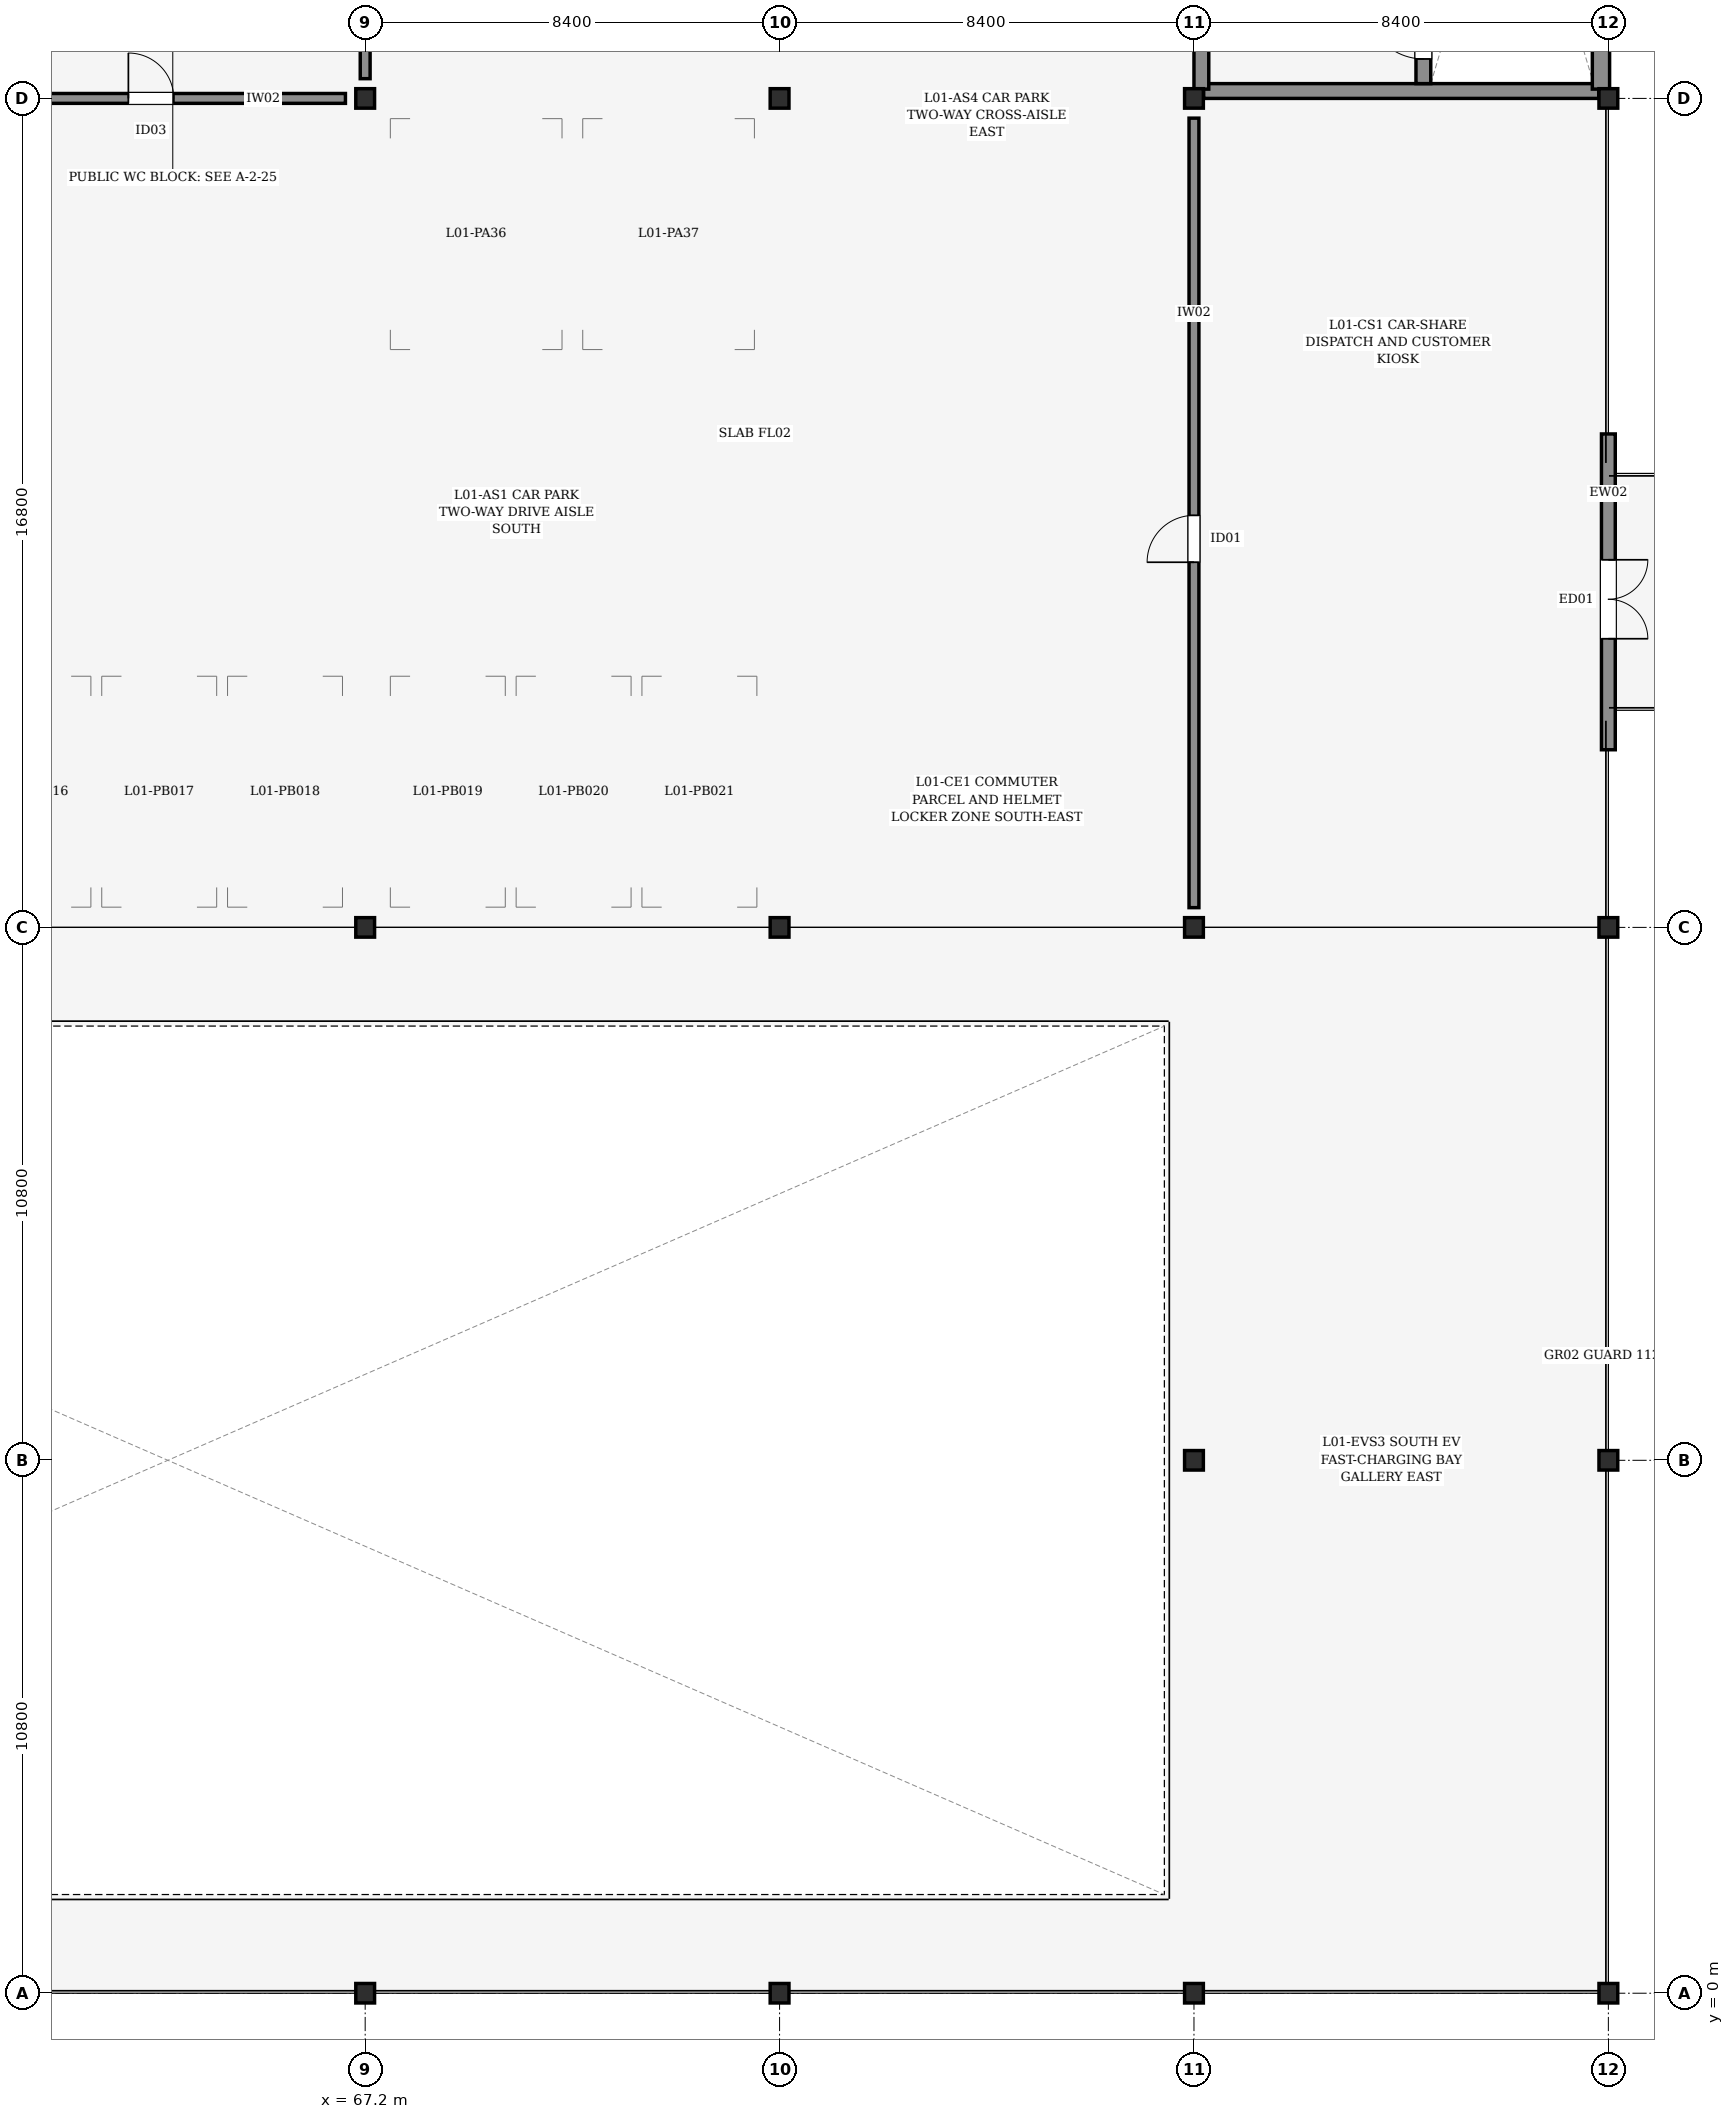
"""IFC4 building model, lengths in metres.
Left out: names, types, materials, properties, quantities, classifications, styles, units other than length and angle.
Written with IfcOpenShell. Run it as: python <this file> out.ifc"""

import sys

from ifc_helpers import new_model, si_unit, direction, frame, frame_2d, origin, origin_2d, place, context, subcontext, project, spatial, rectangle, i_section, extrude, element, fill, save


model = new_model("IFC4")
c1 = context("Model", 3, precision=1e-05, world=origin(), true_north=direction((0.0, 1.0)))
c2 = subcontext(c1, "Body", "Model", "MODEL_VIEW")
j1 = project(units=[si_unit("LENGTHUNIT", "METRE"), si_unit("PLANEANGLEUNIT", "RADIAN")], contexts=[c1])
p1 = place(None, origin())
s1 = spatial("IfcSite", under=j1, at=p1, CompositionType="ELEMENT")
p2 = place(p1, origin())
s2 = spatial("IfcBuilding", under=s1, at=p2, CompositionType="ELEMENT")
p3 = place(p2, frame((0.0, 0.0, 5.4)))
s3 = spatial("IfcBuildingStorey", under=s2, at=p3, CompositionType="ELEMENT", Elevation=5.4)
for number, where, z_axis, x_axis in (
    (1, (67.2, 0.0, 0.0), (0.0, 0.0, 1.0), (1.0, 0.0, 0.0)),
    (2, (67.2, 21.6, 0.0), (0.0, 0.0, 1.0), (1.0, 0.0, 0.0)),
    (3, (67.2, 38.4, 0.0), (0.0, 0.0, 1.0), (1.0, 0.0, 0.0)),
    (4, (75.6, 0.0, 0.0), (0.0, 0.0, 1.0), (1.0, 0.0, 0.0)),
    (5, (75.6, 21.6, 0.0), (0.0, 0.0, 1.0), (1.0, 0.0, 0.0)),
    (6, (75.6, 38.4, 0.0), (0.0, 0.0, 1.0), (1.0, 0.0, 0.0)),
    (7, (84.0, 0.0, 0.0), (0.0, 0.0, 1.0), (1.0, 0.0, 0.0)),
    (8, (84.0, 10.8, 0.0), (0.0, 0.0, 1.0), (1.0, 0.0, 0.0)),
    (9, (84.0, 21.6, 0.0), (0.0, 0.0, 1.0), (1.0, 0.0, 0.0)),
    (10, (84.0, 38.4, 0.0), (0.0, 0.0, 1.0), (1.0, 0.0, 0.0)),
    (11, (92.4, 0.0, 0.0), (0.0, 0.0, 1.0), (1.0, 0.0, 0.0)),
    (12, (92.4, 10.8, 0.0), (0.0, 0.0, 1.0), (1.0, 0.0, 0.0)),
    (13, (92.4, 21.6, 0.0), (0.0, 0.0, 1.0), (1.0, 0.0, 0.0)),
    (14, (92.4, 38.4, 0.0), (0.0, 0.0, 1.0), (1.0, 0.0, 0.0)),
):
    element("IfcColumn", number, at=place(p3, frame(where, z_axis=z_axis, x_axis=x_axis)), inside=s3, PredefinedType="COLUMN", context=c2, shape_type="SweptSolid", body=[
        extrude(i_section(OverallWidth=0.395, OverallDepth=0.381, WebThickness=0.018, FlangeThickness=0.03, FilletRadius=0.015, at=origin_2d()), origin(), (0.0, 0.0, 1.0), 3.6),
    ])
p4 = place(p3, frame((92.4, 25.2, 0.0), z_axis=(0.0, 0.0, 1.0), x_axis=(0.0, 1.0, 0.0)))
e15 = element("IfcWall", 15, at=p4, inside=s3, PredefinedType="STANDARD", context=c2, shape_type="SweptSolid", body=[
    extrude(rectangle(XDim=6.4, YDim=0.28, at=frame_2d((3.2, 0.0))), origin(), (0.0, 0.0, 1.0), 2.535),
])
p5 = place(p4, frame((2.25, 0.0, 0.0)))
e16 = element("IfcOpeningElement", 16, at=p5, cuts=e15, PredefinedType="OPENING", context=c2, shape_type="SweptSolid", body=[
    extrude(rectangle(XDim=1.6, YDim=2.2, at=frame_2d((0.8, 1.1))), frame((0.0, 0.15, 0.0), z_axis=(0.0, -1.0, 0.0), x_axis=(1.0, 0.0, 0.0)), (0.0, 0.0, 1.0), 0.3),
])
p6 = place(p3, frame((84.196, 38.55, 0.0), z_axis=(0.0, 0.0, 1.0), x_axis=(1.0, 0.0, 0.0)))
e17 = element("IfcWall", 17, at=p6, inside=s3, PredefinedType="SHEAR", context=c2, shape_type="SweptSolid", body=[
    extrude(rectangle(XDim=8.009, YDim=0.3, at=frame_2d((4.004, 0.0))), origin(), (0.0, 0.0, 1.0), 3.38),
])
p7 = place(p3, frame((92.25, 38.588, 0.0), z_axis=(0.0, 0.0, 1.0), x_axis=(0.0, 1.0, 0.0)))
e18 = element("IfcWall", 18, at=p7, inside=s3, PredefinedType="SHEAR", context=c2, shape_type="SweptSolid", body=[
    extrude(rectangle(XDim=16.423, YDim=0.35, at=frame_2d((8.211, 0.0))), origin(), (0.0, 0.0, 1.0), 3.38),
])
p8 = place(p3, frame((84.15, 38.588, 0.0), z_axis=(0.0, 0.0, 1.0), x_axis=(0.0, 1.0, 0.0)))
e19 = element("IfcWall", 19, at=p8, inside=s3, PredefinedType="SHEAR", context=c2, shape_type="SweptSolid", body=[
    extrude(rectangle(XDim=16.423, YDim=0.3, at=frame_2d((8.211, 0.0))), origin(), (0.0, 0.0, 1.0), 3.38),
])
p9 = place(p8, frame((5.662, 0.0, 0.0)))
e20 = element("IfcOpeningElement", 20, at=p9, cuts=e19, PredefinedType="OPENING", context=c2, shape_type="SweptSolid", body=[
    extrude(rectangle(XDim=1.25, YDim=2.15, at=frame_2d((0.625, 1.075))), frame((0.0, 0.16, 0.0), z_axis=(0.0, -1.0, 0.0), x_axis=(1.0, 0.0, 0.0)), (0.0, 0.0, 1.0), 0.32),
])
p10 = place(p3, frame((88.65, 38.7, 0.0), z_axis=(0.0, 0.0, 1.0), x_axis=(0.0, 1.0, 0.0)))
e21 = element("IfcWall", 21, at=p10, inside=s3, PredefinedType="SHEAR", context=c2, shape_type="SweptSolid", body=[
    extrude(rectangle(XDim=16.2, YDim=0.3, at=frame_2d((8.1, 0.0))), origin(), (0.0, 0.0, 1.0), 3.38),
])
p11 = place(p10, frame((0.5, 0.0, 0.0)))
e22 = element("IfcOpeningElement", 22, at=p11, cuts=e21, PredefinedType="OPENING", context=c2, shape_type="SweptSolid", body=[
    extrude(rectangle(XDim=1.15, YDim=2.15, at=frame_2d((0.575, 1.075))), frame((0.0, 0.16, 0.0), z_axis=(0.0, -1.0, 0.0), x_axis=(1.0, 0.0, 0.0)), (0.0, 0.0, 1.0), 0.32),
])
p12 = place(p3, frame((59.2, 38.4, 0.0), z_axis=(0.0, 0.0, 1.0), x_axis=(1.0, 0.0, 0.0)))
e23 = element("IfcWall", 23, at=p12, inside=s3, PredefinedType="PARTITIONING", context=c2, shape_type="SweptSolid", body=[
    extrude(rectangle(XDim=7.6, YDim=0.2, at=frame_2d((3.8, 0.0))), origin(), (0.0, 0.0, 1.0), 2.525),
])
p13 = place(p12, frame((3.2, 0.0, 0.0)))
e24 = element("IfcOpeningElement", 24, at=p13, cuts=e23, PredefinedType="OPENING", context=c2, shape_type="SweptSolid", body=[
    extrude(rectangle(XDim=0.92, YDim=2.1, at=frame_2d((0.46, 1.05))), frame((0.0, 0.11, 0.0), z_axis=(0.0, -1.0, 0.0), x_axis=(1.0, 0.0, 0.0)), (0.0, 0.0, 1.0), 0.22),
])
p14 = place(p3, frame((67.2, 38.8, 0.0), z_axis=(0.0, 0.0, 1.0), x_axis=(0.0, 1.0, 0.0)))
e25 = element("IfcWall", 25, at=p14, inside=s3, PredefinedType="PARTITIONING", context=c2, shape_type="SweptSolid", body=[
    extrude(rectangle(XDim=7.6, YDim=0.2, at=frame_2d((3.8, 0.0))), origin(), (0.0, 0.0, 1.0), 2.525),
])
p15 = place(p3, frame((84.0, 22.0, 0.0), z_axis=(0.0, 0.0, 1.0), x_axis=(0.0, 1.0, 0.0)))
e26 = element("IfcWall", 26, at=p15, inside=s3, PredefinedType="PARTITIONING", context=c2, shape_type="SweptSolid", body=[
    extrude(rectangle(XDim=16.0, YDim=0.2, at=frame_2d((8.0, 0.0))), origin(), (0.0, 0.0, 1.0), 2.525),
])
p16 = place(p15, frame((7.0, 0.0, 0.0)))
e27 = element("IfcOpeningElement", 27, at=p16, cuts=e26, PredefinedType="OPENING", context=c2, shape_type="SweptSolid", body=[
    extrude(rectangle(XDim=0.95, YDim=2.1, at=frame_2d((0.475, 1.05))), frame((0.0, 0.11, 0.0), z_axis=(0.0, -1.0, 0.0), x_axis=(1.0, 0.0, 0.0)), (0.0, 0.0, 1.0), 0.22),
])
p17 = place(p5, frame((1.6, 0.0, 0.0), z_axis=(0.0, 0.0, 1.0), x_axis=(-1.0, 0.0, 0.0)))
e28 = element("IfcDoor", 28, at=p17, inside=s3, OperationType="DOUBLE_DOOR_SINGLE_SWING", PredefinedType="DOOR", context=c2, shape_type="SweptSolid", body=[
    extrude(rectangle(XDim=1.6, YDim=2.2, at=frame_2d((0.8, 1.1))), frame((0.0, 0.025, 0.0), z_axis=(0.0, -1.0, 0.0), x_axis=(1.0, 0.0, 0.0)), (0.0, 0.0, 1.0), 0.05),
])
fill(e16, e28)
p18 = place(p11, origin())
e29 = element("IfcDoor", 29, at=p18, inside=s3, OperationType="SINGLE_SWING_RIGHT", PredefinedType="DOOR", context=c2, shape_type="SweptSolid", body=[
    extrude(rectangle(XDim=1.15, YDim=2.15, at=frame_2d((0.575, 1.075))), frame((0.0, 0.025, 0.0), z_axis=(0.0, -1.0, 0.0), x_axis=(1.0, 0.0, 0.0)), (0.0, 0.0, 1.0), 0.05),
])
fill(e22, e29)
p19 = place(p13, origin())
e30 = element("IfcDoor", 30, at=p19, inside=s3, OperationType="SINGLE_SWING_LEFT", PredefinedType="DOOR", context=c2, shape_type="SweptSolid", body=[
    extrude(rectangle(XDim=0.92, YDim=2.1, at=frame_2d((0.46, 1.05))), frame((0.0, 0.025, 0.0), z_axis=(0.0, -1.0, 0.0), x_axis=(1.0, 0.0, 0.0)), (0.0, 0.0, 1.0), 0.05),
])
fill(e24, e30)
p20 = place(p16, origin())
e31 = element("IfcDoor", 31, at=p20, inside=s3, OperationType="SINGLE_SWING_LEFT", PredefinedType="DOOR", context=c2, shape_type="SweptSolid", body=[
    extrude(rectangle(XDim=0.95, YDim=2.1, at=frame_2d((0.475, 1.05))), frame((0.0, 0.025, 0.0), z_axis=(0.0, -1.0, 0.0), x_axis=(1.0, 0.0, 0.0)), (0.0, 0.0, 1.0), 0.05),
])
fill(e27, e31)
save(model, sys.argv[1])
